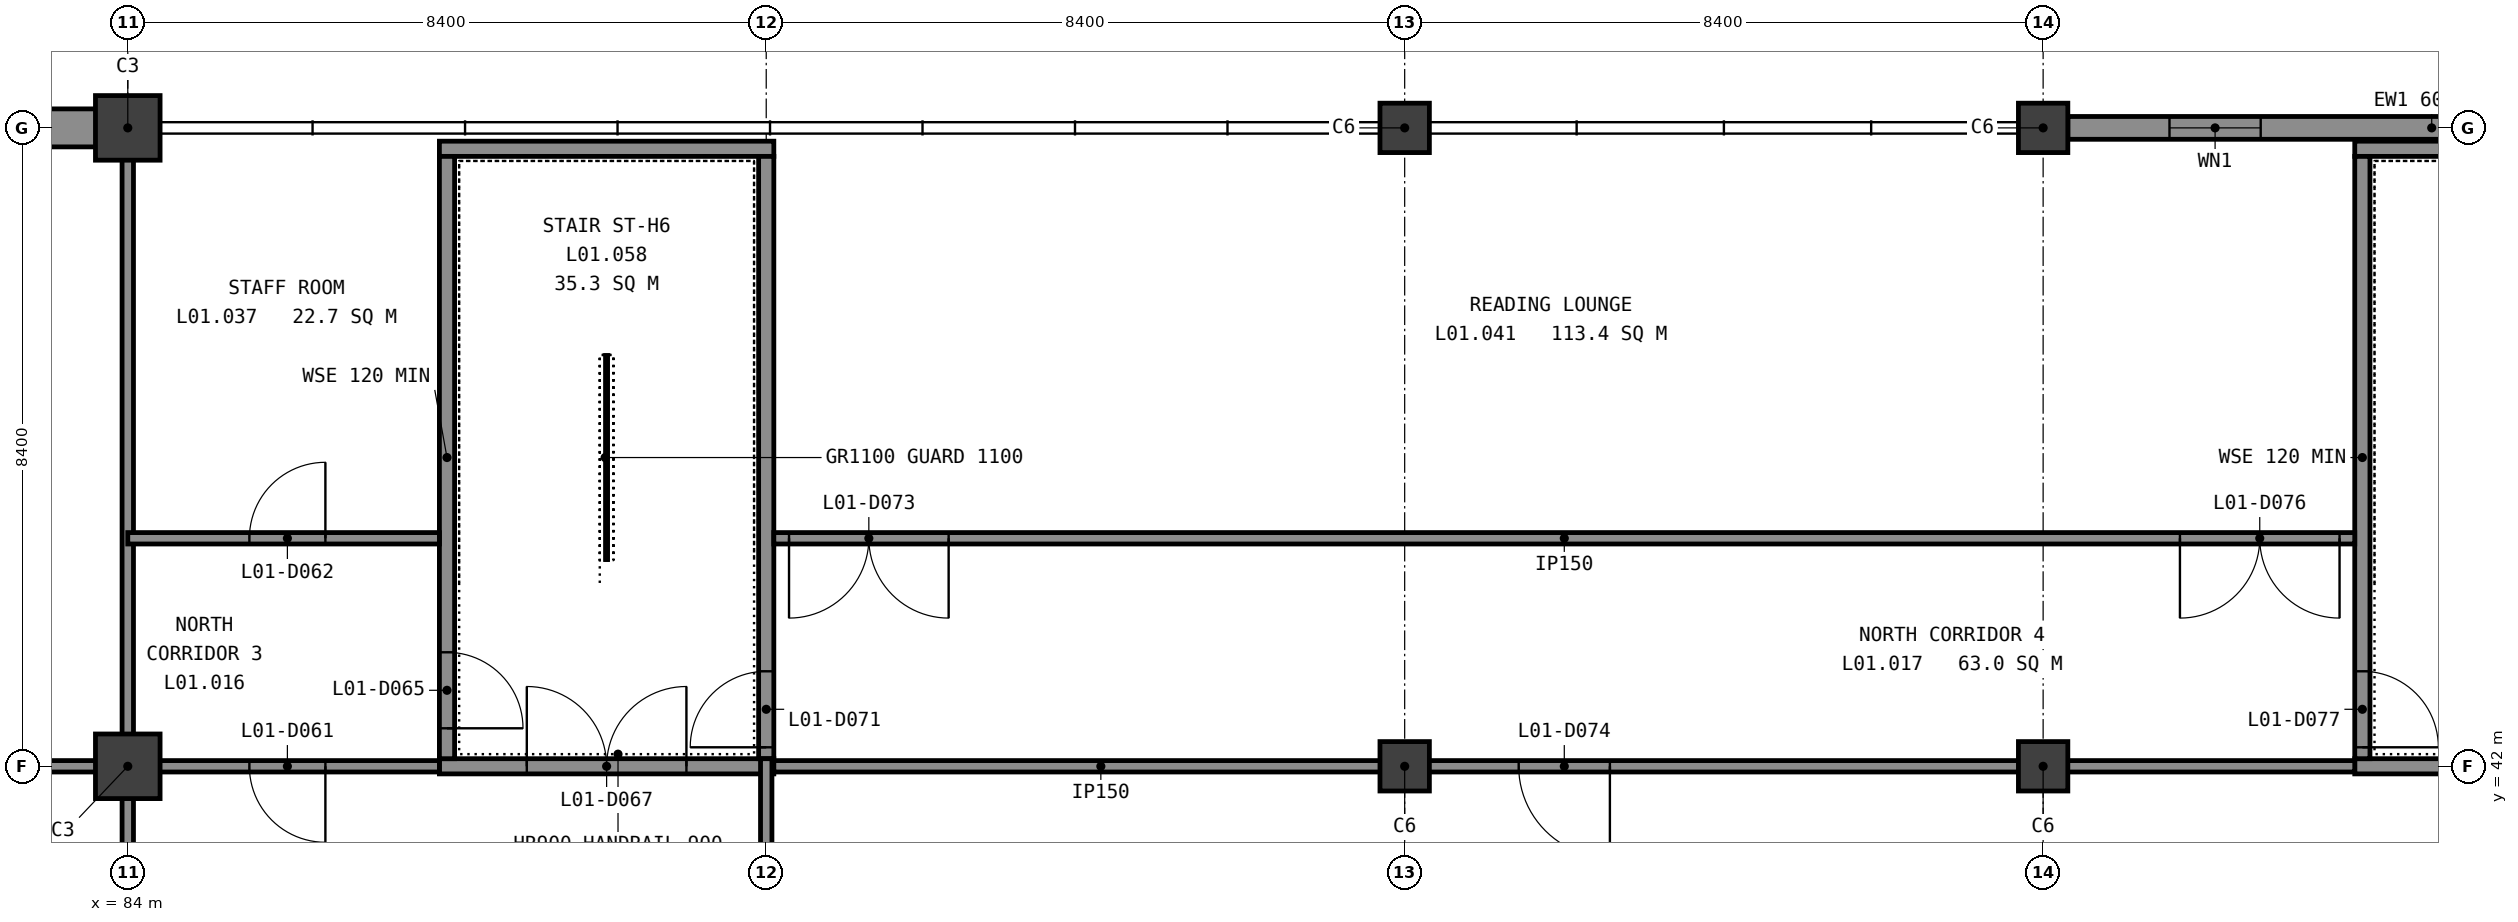
"""IFC4 building model, lengths in metres.
Left out: names, types, materials, properties, quantities, classifications, styles, units other than length and angle.
Written with IfcOpenShell. Run it as: python <this file> out.ifc"""

import sys

from ifc_helpers import new_model, si_unit, direction, frame, frame_2d, origin, origin_2d, place, context, subcontext, project, spatial, rectangle, extrude, element, fill, save


model = new_model("IFC4")
c1 = context("Model", 3, precision=1e-05, world=origin(), true_north=direction((0.0, 1.0)))
c2 = subcontext(c1, "Body", "Model", "MODEL_VIEW")
j1 = project(units=[si_unit("LENGTHUNIT", "METRE"), si_unit("PLANEANGLEUNIT", "RADIAN")], contexts=[c1])
p1 = place(None, origin())
s1 = spatial("IfcSite", under=j1, at=p1, CompositionType="ELEMENT")
p2 = place(p1, origin())
s2 = spatial("IfcBuilding", under=s1, at=p2, CompositionType="ELEMENT")
p3 = place(p2, frame((0.0, 0.0, 5.4)))
s3 = spatial("IfcBuildingStorey", under=s2, at=p3, CompositionType="ELEMENT", Elevation=5.4)
for number, where, z_axis, x_axis in (
    (1, (84.0, 42.0, -0.3), (0.0, 0.0, 1.0), (1.0, 0.0, 0.0)),
    (2, (84.0, 50.4, -0.3), (0.0, 0.0, 1.0), (1.0, 0.0, 0.0)),
):
    element("IfcColumn", number, at=place(p3, frame(where, z_axis=z_axis, x_axis=x_axis)), inside=s3, PredefinedType="COLUMN", context=c2, shape_type="SweptSolid", body=[
        extrude(rectangle(XDim=0.85, YDim=0.85, at=origin_2d()), origin(), (0.0, 0.0, 1.0), 4.55),
    ])
for number, where, z_axis, x_axis in (
    (3, (100.8, 42.0, -0.3), (0.0, 0.0, 1.0), (1.0, 0.0, 0.0)),
    (4, (100.8, 50.4, -0.3), (0.0, 0.0, 1.0), (1.0, 0.0, 0.0)),
    (5, (109.2, 42.0, -0.3), (0.0, 0.0, 1.0), (1.0, 0.0, 0.0)),
    (6, (109.2, 50.4, -0.3), (0.0, 0.0, 1.0), (1.0, 0.0, 0.0)),
):
    element("IfcColumn", number, at=place(p3, frame(where, z_axis=z_axis, x_axis=x_axis)), inside=s3, PredefinedType="COLUMN", context=c2, shape_type="SweptSolid", body=[
        extrude(rectangle(XDim=0.65, YDim=0.65, at=origin_2d()), origin(), (0.0, 0.0, 1.0), 4.55),
    ])
p4 = place(p3, frame((42.0, 50.4, -0.3), z_axis=(0.0, 0.0, 1.0), x_axis=(1.0, 0.0, 0.0)))
e7 = element("IfcWall", 7, at=p4, inside=s3, PredefinedType="SHEAR", context=c2, shape_type="SweptSolid", body=[
    extrude(rectangle(XDim=42.0, YDim=0.5, at=frame_2d((21.0, 0.0))), origin(), (0.0, 0.0, 1.0), 4.55),
])
p5 = place(p3, frame((109.525, 50.4, 0.0), z_axis=(0.0, 0.0, 1.0), x_axis=(1.0, 0.0, 0.0)))
e8 = element("IfcWall", 8, at=p5, inside=s3, PredefinedType="STANDARD", context=c2, shape_type="SweptSolid", body=[
    extrude(rectangle(XDim=16.15, YDim=0.3, at=frame_2d((8.075, 0.0))), origin(), (0.0, 0.0, 1.0), 4.2),
])
p6 = place(p5, frame((1.337, 0.0, 0.9)))
e9 = element("IfcOpeningElement", 9, at=p6, cuts=e8, PredefinedType="OPENING", context=c2, shape_type="SweptSolid", body=[
    extrude(rectangle(XDim=1.2, YDim=1.5, at=frame_2d((0.6, 0.75))), frame((0.0, 0.16, 0.0), z_axis=(0.0, -1.0, 0.0), x_axis=(1.0, 0.0, 0.0)), (0.0, 0.0, 1.0), 0.32),
])
p7 = place(p5, frame((10.025, 0.0, 0.9)))
e10 = element("IfcOpeningElement", 10, at=p7, cuts=e8, PredefinedType="OPENING", context=c2, shape_type="SweptSolid", body=[
    extrude(rectangle(XDim=4.2, YDim=1.5, at=frame_2d((2.1, 0.75))), frame((0.0, 0.16, 0.0), z_axis=(0.0, -1.0, 0.0), x_axis=(1.0, 0.0, 0.0)), (0.0, 0.0, 1.0), 0.32),
])
p8 = place(p3, frame((88.1, 42.0, -0.3), z_axis=(0.0, 0.0, 1.0), x_axis=(1.0, 0.0, 0.0)))
e11 = element("IfcWall", 11, at=p8, inside=s3, PredefinedType="SHEAR", context=c2, shape_type="SweptSolid", body=[
    extrude(rectangle(XDim=4.4, YDim=0.2, at=frame_2d((2.2, 0.0))), origin(), (0.0, 0.0, 1.0), 4.5),
])
p9 = place(p8, frame((1.15, 0.0, 0.3)))
e12 = element("IfcOpeningElement", 12, at=p9, cuts=e11, PredefinedType="OPENING", context=c2, shape_type="SweptSolid", body=[
    extrude(rectangle(XDim=2.1, YDim=2.1, at=frame_2d((1.05, 1.05))), frame((0.0, 0.11, 0.0), z_axis=(0.0, -1.0, 0.0), x_axis=(1.0, 0.0, 0.0)), (0.0, 0.0, 1.0), 0.22),
])
p10 = place(p3, frame((88.1, 50.125, -0.3), z_axis=(0.0, 0.0, 1.0), x_axis=(1.0, 0.0, 0.0)))
e13 = element("IfcWall", 13, at=p10, inside=s3, PredefinedType="SHEAR", context=c2, shape_type="SweptSolid", body=[
    extrude(rectangle(XDim=4.4, YDim=0.2, at=frame_2d((2.2, 0.0))), origin(), (0.0, 0.0, 1.0), 4.5),
])
p11 = place(p3, frame((88.2, 42.1, -0.3), z_axis=(0.0, 0.0, 1.0), x_axis=(0.0, 1.0, 0.0)))
e14 = element("IfcWall", 14, at=p11, inside=s3, PredefinedType="SHEAR", context=c2, shape_type="SweptSolid", body=[
    extrude(rectangle(XDim=7.925, YDim=0.2, at=frame_2d((3.962, 0.0))), origin(), (0.0, 0.0, 1.0), 4.5),
])
p12 = place(p11, frame((0.4, 0.0, 0.3)))
e15 = element("IfcOpeningElement", 15, at=p12, cuts=e14, PredefinedType="OPENING", context=c2, shape_type="SweptSolid", body=[
    extrude(rectangle(XDim=1.0, YDim=2.1, at=frame_2d((0.5, 1.05))), frame((0.0, 0.11, 0.0), z_axis=(0.0, -1.0, 0.0), x_axis=(1.0, 0.0, 0.0)), (0.0, 0.0, 1.0), 0.22),
])
p13 = place(p3, frame((92.4, 42.1, -0.3), z_axis=(0.0, 0.0, 1.0), x_axis=(0.0, 1.0, 0.0)))
e16 = element("IfcWall", 16, at=p13, inside=s3, PredefinedType="SHEAR", context=c2, shape_type="SweptSolid", body=[
    extrude(rectangle(XDim=7.925, YDim=0.2, at=frame_2d((3.962, 0.0))), origin(), (0.0, 0.0, 1.0), 4.5),
])
p14 = place(p13, frame((0.15, 0.0, 0.3)))
e17 = element("IfcOpeningElement", 17, at=p14, cuts=e16, PredefinedType="OPENING", context=c2, shape_type="SweptSolid", body=[
    extrude(rectangle(XDim=1.0, YDim=2.1, at=frame_2d((0.5, 1.05))), frame((0.0, 0.11, 0.0), z_axis=(0.0, -1.0, 0.0), x_axis=(1.0, 0.0, 0.0)), (0.0, 0.0, 1.0), 0.22),
])
for number, where, z_axis, x_axis in (
    (18, (113.3, 42.0, -0.3), (0.0, 0.0, 1.0), (1.0, 0.0, 0.0)),
    (19, (113.3, 50.125, -0.3), (0.0, 0.0, 1.0), (1.0, 0.0, 0.0)),
):
    element("IfcWall", number, at=place(p3, frame(where, z_axis=z_axis, x_axis=x_axis)), inside=s3, PredefinedType="SHEAR", context=c2, shape_type="SweptSolid", body=[
        extrude(rectangle(XDim=4.4, YDim=0.2, at=frame_2d((2.2, 0.0))), origin(), (0.0, 0.0, 1.0), 4.5),
    ])
p15 = place(p3, frame((113.4, 42.1, -0.3), z_axis=(0.0, 0.0, 1.0), x_axis=(0.0, 1.0, 0.0)))
e20 = element("IfcWall", 20, at=p15, inside=s3, PredefinedType="SHEAR", context=c2, shape_type="SweptSolid", body=[
    extrude(rectangle(XDim=7.925, YDim=0.2, at=frame_2d((3.962, 0.0))), origin(), (0.0, 0.0, 1.0), 4.5),
])
p16 = place(p15, frame((0.15, 0.0, 0.3)))
e21 = element("IfcOpeningElement", 21, at=p16, cuts=e20, PredefinedType="OPENING", context=c2, shape_type="SweptSolid", body=[
    extrude(rectangle(XDim=1.0, YDim=2.1, at=frame_2d((0.5, 1.05))), frame((0.0, 0.11, 0.0), z_axis=(0.0, -1.0, 0.0), x_axis=(1.0, 0.0, 0.0)), (0.0, 0.0, 1.0), 0.22),
])
p17 = place(p3, frame((42.1, 42.0, -0.3), z_axis=(0.0, 0.0, 1.0), x_axis=(1.0, 0.0, 0.0)))
e22 = element("IfcWall", 22, at=p17, inside=s3, PredefinedType="PARTITIONING", context=c2, shape_type="SweptSolid", body=[
    extrude(rectangle(XDim=41.9, YDim=0.15, at=frame_2d((20.95, 0.0))), origin(), (0.0, 0.0, 1.0), 4.5),
])
p18 = place(p3, frame((84.0, 42.075, -0.3), z_axis=(0.0, 0.0, 1.0), x_axis=(0.0, 1.0, 0.0)))
e23 = element("IfcWall", 23, at=p18, inside=s3, PredefinedType="PARTITIONING", context=c2, shape_type="SweptSolid", body=[
    extrude(rectangle(XDim=8.075, YDim=0.15, at=frame_2d((4.038, 0.0))), origin(), (0.0, 0.0, 1.0), 3.9),
])
p19 = place(p3, frame((83.925, 42.0, 0.0), z_axis=(0.0, 0.0, 1.0), x_axis=(1.0, 0.0, 0.0)))
e24 = element("IfcWall", 24, at=p19, inside=s3, PredefinedType="PARTITIONING", context=c2, shape_type="SweptSolid", body=[
    extrude(rectangle(XDim=4.175, YDim=0.15, at=frame_2d((2.087, 0.0))), origin(), (0.0, 0.0, 1.0), 4.2),
])
p20 = place(p19, frame((1.675, 0.0, 0.0)))
e25 = element("IfcOpeningElement", 25, at=p20, cuts=e24, PredefinedType="OPENING", context=c2, shape_type="SweptSolid", body=[
    extrude(rectangle(XDim=1.0, YDim=2.1, at=frame_2d((0.5, 1.05))), frame((0.0, 0.085, 0.0), z_axis=(0.0, -1.0, 0.0), x_axis=(1.0, 0.0, 0.0)), (0.0, 0.0, 1.0), 0.17),
])
p21 = place(p3, frame((92.5, 42.0, 0.0), z_axis=(0.0, 0.0, 1.0), x_axis=(1.0, 0.0, 0.0)))
e26 = element("IfcWall", 26, at=p21, inside=s3, PredefinedType="PARTITIONING", context=c2, shape_type="SweptSolid", body=[
    extrude(rectangle(XDim=8.605, YDim=0.15, at=frame_2d((4.302, 0.0))), origin(), (0.0, 0.0, 1.0), 4.2),
])
p22 = place(p3, frame((101.105, 42.0, 0.0), z_axis=(0.0, 0.0, 1.0), x_axis=(1.0, 0.0, 0.0)))
e27 = element("IfcWall", 27, at=p22, inside=s3, PredefinedType="PARTITIONING", context=c2, shape_type="SweptSolid", body=[
    extrude(rectangle(XDim=7.79, YDim=0.15, at=frame_2d((3.895, 0.0))), origin(), (0.0, 0.0, 1.0), 3.5),
])
p23 = place(p22, frame((1.195, 0.0, 0.0)))
e28 = element("IfcOpeningElement", 28, at=p23, cuts=e27, PredefinedType="OPENING", context=c2, shape_type="SweptSolid", body=[
    extrude(rectangle(XDim=1.2, YDim=2.1, at=frame_2d((0.6, 1.05))), frame((0.0, 0.085, 0.0), z_axis=(0.0, -1.0, 0.0), x_axis=(1.0, 0.0, 0.0)), (0.0, 0.0, 1.0), 0.17),
])
p24 = place(p3, frame((108.895, 42.0, 0.0), z_axis=(0.0, 0.0, 1.0), x_axis=(1.0, 0.0, 0.0)))
e29 = element("IfcWall", 29, at=p24, inside=s3, PredefinedType="PARTITIONING", context=c2, shape_type="SweptSolid", body=[
    extrude(rectangle(XDim=4.405, YDim=0.15, at=frame_2d((2.203, 0.0))), origin(), (0.0, 0.0, 1.0), 4.2),
])
p25 = place(p3, frame((84.0, 45.0, 0.0), z_axis=(0.0, 0.0, 1.0), x_axis=(1.0, 0.0, 0.0)))
e30 = element("IfcWall", 30, at=p25, inside=s3, PredefinedType="PARTITIONING", context=c2, shape_type="SweptSolid", body=[
    extrude(rectangle(XDim=4.1, YDim=0.15, at=frame_2d((2.05, 0.0))), origin(), (0.0, 0.0, 1.0), 4.2),
])
p26 = place(p25, frame((1.6, 0.0, 0.0)))
e31 = element("IfcOpeningElement", 31, at=p26, cuts=e30, PredefinedType="OPENING", context=c2, shape_type="SweptSolid", body=[
    extrude(rectangle(XDim=1.0, YDim=2.1, at=frame_2d((0.5, 1.05))), frame((0.0, 0.085, 0.0), z_axis=(0.0, -1.0, 0.0), x_axis=(1.0, 0.0, 0.0)), (0.0, 0.0, 1.0), 0.17),
])
p27 = place(p3, frame((92.5, 45.0, 0.0), z_axis=(0.0, 0.0, 1.0), x_axis=(1.0, 0.0, 0.0)))
e32 = element("IfcWall", 32, at=p27, inside=s3, PredefinedType="PARTITIONING", context=c2, shape_type="SweptSolid", body=[
    extrude(rectangle(XDim=20.8, YDim=0.15, at=frame_2d((10.4, 0.0))), origin(), (0.0, 0.0, 1.0), 4.2),
])
p28 = place(p27, frame((0.2, 0.0, 0.0)))
e33 = element("IfcOpeningElement", 33, at=p28, cuts=e32, PredefinedType="OPENING", context=c2, shape_type="SweptSolid", body=[
    extrude(rectangle(XDim=2.1, YDim=2.25, at=frame_2d((1.05, 1.125))), frame((0.0, 0.085, 0.0), z_axis=(0.0, -1.0, 0.0), x_axis=(1.0, 0.0, 0.0)), (0.0, 0.0, 1.0), 0.17),
])
p29 = place(p27, frame((18.5, 0.0, 0.0)))
e34 = element("IfcOpeningElement", 34, at=p29, cuts=e32, PredefinedType="OPENING", context=c2, shape_type="SweptSolid", body=[
    extrude(rectangle(XDim=2.1, YDim=2.25, at=frame_2d((1.05, 1.125))), frame((0.0, 0.085, 0.0), z_axis=(0.0, -1.0, 0.0), x_axis=(1.0, 0.0, 0.0)), (0.0, 0.0, 1.0), 0.17),
])
p30 = place(p3, frame((84.0, 37.8, 0.0), z_axis=(0.0, 0.0, 1.0), x_axis=(0.0, 1.0, 0.0)))
e35 = element("IfcWall", 35, at=p30, inside=s3, PredefinedType="PARTITIONING", context=c2, shape_type="SweptSolid", body=[
    extrude(rectangle(XDim=4.125, YDim=0.15, at=frame_2d((2.062, 0.0))), origin(), (0.0, 0.0, 1.0), 3.6),
])
p31 = place(p30, frame((1.4, 0.0, 0.0)))
e36 = element("IfcOpeningElement", 36, at=p31, cuts=e35, PredefinedType="OPENING", context=c2, shape_type="SweptSolid", body=[
    extrude(rectangle(XDim=1.0, YDim=2.1, at=frame_2d((0.5, 1.05))), frame((0.0, 0.085, 0.0), z_axis=(0.0, -1.0, 0.0), x_axis=(1.0, 0.0, 0.0)), (0.0, 0.0, 1.0), 0.17),
])
p32 = place(p3, frame((92.4, 33.295, 0.0), z_axis=(0.0, 0.0, 1.0), x_axis=(0.0, 1.0, 0.0)))
e37 = element("IfcWall", 37, at=p32, inside=s3, PredefinedType="PARTITIONING", context=c2, shape_type="SweptSolid", body=[
    extrude(rectangle(XDim=8.805, YDim=0.15, at=frame_2d((4.403, 0.0))), origin(), (0.0, 0.0, 1.0), 4.2),
])
p33 = place(p6, origin())
e38 = element("IfcWindow", 38, at=p33, inside=s3, PartitioningType="SINGLE_PANEL", PredefinedType="WINDOW", context=c2, shape_type="SweptSolid", body=[
    extrude(rectangle(XDim=1.2, YDim=1.5, at=frame_2d((0.6, 0.75))), frame((0.0, 0.03, 0.0), z_axis=(0.0, -1.0, 0.0), x_axis=(1.0, 0.0, 0.0)), (0.0, 0.0, 1.0), 0.06),
])
fill(e9, e38)
p34 = place(p9, origin())
e39 = element("IfcDoor", 39, at=p34, inside=s3, OperationType="DOUBLE_DOOR_SINGLE_SWING", PredefinedType="DOOR", context=c2, shape_type="SweptSolid", body=[
    extrude(rectangle(XDim=2.1, YDim=2.1, at=frame_2d((1.05, 1.05))), frame((0.0, 0.025, 0.0), z_axis=(0.0, -1.0, 0.0), x_axis=(1.0, 0.0, 0.0)), (0.0, 0.0, 1.0), 0.05),
])
fill(e12, e39)
p35 = place(p14, origin())
e40 = element("IfcDoor", 40, at=p35, inside=s3, OperationType="SINGLE_SWING_RIGHT", PredefinedType="DOOR", context=c2, shape_type="SweptSolid", body=[
    extrude(rectangle(XDim=1.0, YDim=2.1, at=frame_2d((0.5, 1.05))), frame((0.0, 0.025, 0.0), z_axis=(0.0, -1.0, 0.0), x_axis=(1.0, 0.0, 0.0)), (0.0, 0.0, 1.0), 0.05),
])
fill(e17, e40)
p36 = place(p16, origin())
e41 = element("IfcDoor", 41, at=p36, inside=s3, OperationType="SINGLE_SWING_LEFT", PredefinedType="DOOR", context=c2, shape_type="SweptSolid", body=[
    extrude(rectangle(XDim=1.0, YDim=2.1, at=frame_2d((0.5, 1.05))), frame((0.0, 0.025, 0.0), z_axis=(0.0, -1.0, 0.0), x_axis=(1.0, 0.0, 0.0)), (0.0, 0.0, 1.0), 0.05),
])
fill(e21, e41)
p37 = place(p26, origin())
e42 = element("IfcDoor", 42, at=p37, inside=s3, OperationType="SINGLE_SWING_LEFT", PredefinedType="DOOR", context=c2, shape_type="SweptSolid", body=[
    extrude(rectangle(XDim=1.0, YDim=2.1, at=frame_2d((0.5, 1.05))), frame((0.0, 0.025, 0.0), z_axis=(0.0, -1.0, 0.0), x_axis=(1.0, 0.0, 0.0)), (0.0, 0.0, 1.0), 0.05),
])
fill(e31, e42)
p38 = place(p23, origin())
e43 = element("IfcDoor", 43, at=p38, inside=s3, OperationType="SINGLE_SWING_RIGHT", PredefinedType="DOOR", context=c2, shape_type="SweptSolid", body=[
    extrude(rectangle(XDim=1.2, YDim=2.1, at=frame_2d((0.6, 1.05))), frame((0.0, 0.025, 0.0), z_axis=(0.0, -1.0, 0.0), x_axis=(1.0, 0.0, 0.0)), (0.0, 0.0, 1.0), 0.05),
])
fill(e28, e43)
p39 = place(p28, origin())
e44 = element("IfcDoor", 44, at=p39, inside=s3, OperationType="DOUBLE_DOOR_SINGLE_SWING", PredefinedType="DOOR", context=c2, shape_type="SweptSolid", body=[
    extrude(rectangle(XDim=2.1, YDim=2.25, at=frame_2d((1.05, 1.125))), frame((0.0, 0.025, 0.0), z_axis=(0.0, -1.0, 0.0), x_axis=(1.0, 0.0, 0.0)), (0.0, 0.0, 1.0), 0.05),
])
fill(e33, e44)
p40 = place(p29, origin())
e45 = element("IfcDoor", 45, at=p40, inside=s3, OperationType="DOUBLE_DOOR_SINGLE_SWING", PredefinedType="DOOR", context=c2, shape_type="SweptSolid", body=[
    extrude(rectangle(XDim=2.1, YDim=2.25, at=frame_2d((1.05, 1.125))), frame((0.0, 0.025, 0.0), z_axis=(0.0, -1.0, 0.0), x_axis=(1.0, 0.0, 0.0)), (0.0, 0.0, 1.0), 0.05),
])
fill(e34, e45)
p41 = place(p20, origin())
e46 = element("IfcDoor", 46, at=p41, inside=s3, OperationType="SINGLE_SWING_RIGHT", PredefinedType="DOOR", context=c2, shape_type="SweptSolid", body=[
    extrude(rectangle(XDim=1.0, YDim=2.1, at=frame_2d((0.5, 1.05))), frame((0.0, 0.025, 0.0), z_axis=(0.0, -1.0, 0.0), x_axis=(1.0, 0.0, 0.0)), (0.0, 0.0, 1.0), 0.05),
])
fill(e25, e46)
p42 = place(p12, origin())
e47 = element("IfcDoor", 47, at=p42, inside=s3, OperationType="SINGLE_SWING_LEFT", PredefinedType="DOOR", context=c2, shape_type="SweptSolid", body=[
    extrude(rectangle(XDim=1.0, YDim=2.1, at=frame_2d((0.5, 1.05))), frame((0.0, 0.025, 0.0), z_axis=(0.0, -1.0, 0.0), x_axis=(1.0, 0.0, 0.0)), (0.0, 0.0, 1.0), 0.05),
])
fill(e15, e47)
save(model, sys.argv[1])
